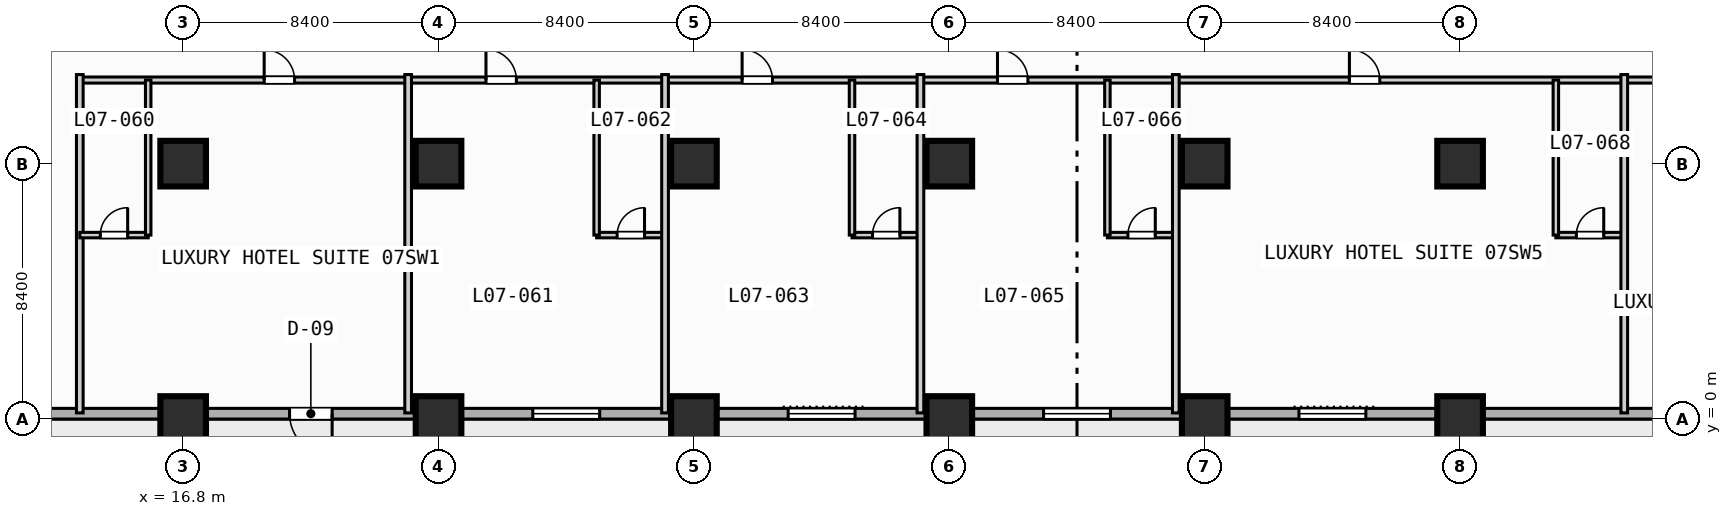
"""IFC4 building model, lengths in metres.
Left out: names, types, materials, properties, quantities, classifications, styles, units other than length and angle.
Written with IfcOpenShell. Run it as: python <this file> out.ifc"""

import sys

from ifc_helpers import new_model, si_unit, direction, frame, frame_2d, origin, origin_2d, place, context, subcontext, project, spatial, rectangle, extrude, element, fill, save


model = new_model("IFC4")
c1 = context("Model", 3, precision=1e-05, world=origin(), true_north=direction((0.0, 1.0)))
c2 = subcontext(c1, "Body", "Model", "MODEL_VIEW")
j1 = project(units=[si_unit("LENGTHUNIT", "METRE"), si_unit("PLANEANGLEUNIT", "RADIAN")], contexts=[c1])
p1 = place(None, origin())
s1 = spatial("IfcSite", under=j1, at=p1, CompositionType="ELEMENT")
p2 = place(p1, origin())
s2 = spatial("IfcBuilding", under=s1, at=p2, CompositionType="ELEMENT")
p3 = place(p2, frame((0.0, 0.0, 35.8)))
s3 = spatial("IfcBuildingStorey", under=s2, at=p3, CompositionType="ELEMENT", Elevation=35.8)
for number, where, z_axis, x_axis in (
    (1, (16.8, 0.0, 0.0), (0.0, 0.0, 1.0), (1.0, 0.0, 0.0)),
    (2, (16.8, 8.4, 0.0), (0.0, 0.0, 1.0), (1.0, 0.0, 0.0)),
    (3, (25.2, 0.0, 0.0), (0.0, 0.0, 1.0), (1.0, 0.0, 0.0)),
    (4, (25.2, 8.4, 0.0), (0.0, 0.0, 1.0), (1.0, 0.0, 0.0)),
    (5, (33.6, 0.0, 0.0), (0.0, 0.0, 1.0), (1.0, 0.0, 0.0)),
    (6, (33.6, 8.4, 0.0), (0.0, 0.0, 1.0), (1.0, 0.0, 0.0)),
    (7, (42.0, 0.0, 0.0), (0.0, 0.0, 1.0), (1.0, 0.0, 0.0)),
    (8, (42.0, 8.4, 0.0), (0.0, 0.0, 1.0), (1.0, 0.0, 0.0)),
    (9, (50.4, 0.0, 0.0), (0.0, 0.0, 1.0), (1.0, 0.0, 0.0)),
    (10, (50.4, 8.4, 0.0), (0.0, 0.0, 1.0), (1.0, 0.0, 0.0)),
    (11, (58.8, 0.0, 0.0), (0.0, 0.0, 1.0), (1.0, 0.0, 0.0)),
    (12, (58.8, 8.4, 0.0), (0.0, 0.0, 1.0), (1.0, 0.0, 0.0)),
):
    element("IfcColumn", number, at=place(p3, frame(where, z_axis=z_axis, x_axis=x_axis)), inside=s3, PredefinedType="COLUMN", context=c2, shape_type="SweptSolid", body=[
        extrude(rectangle(XDim=1.5, YDim=1.5, at=origin_2d()), origin(), (0.0, 0.0, 1.0), 3.8),
    ])
p4 = place(p3, frame((89.225, 0.175, 0.0), z_axis=(0.0, 0.0, 1.0), x_axis=(-1.0, 0.0, 0.0)))
e13 = element("IfcWall", 13, at=p4, inside=s3, PredefinedType="STANDARD", context=c2, shape_type="SweptSolid", body=[
    extrude(rectangle(XDim=86.05, YDim=0.35, at=frame_2d((43.025, 0.0))), origin(), (0.0, 0.0, 1.0), 3.55),
])
p5 = place(p4, frame((67.525, 0.0, 0.0)))
e14 = element("IfcOpeningElement", 14, at=p5, cuts=e13, PredefinedType="OPENING", context=c2, shape_type="SweptSolid", body=[
    extrude(rectangle(XDim=1.4, YDim=2.2, at=frame_2d((0.7, 1.1))), frame((0.0, 0.185, 0.0), z_axis=(0.0, -1.0, 0.0), x_axis=(1.0, 0.0, 0.0)), (0.0, 0.0, 1.0), 0.37),
])
p6 = place(p4, frame((58.725, 0.0, 0.85)))
e15 = element("IfcOpeningElement", 15, at=p6, cuts=e13, PredefinedType="OPENING", context=c2, shape_type="SweptSolid", body=[
    extrude(rectangle(XDim=2.2, YDim=1.8, at=frame_2d((1.1, 0.9))), frame((0.0, 0.185, 0.0), z_axis=(0.0, -1.0, 0.0), x_axis=(1.0, 0.0, 0.0)), (0.0, 0.0, 1.0), 0.37),
])
p7 = place(p4, frame((50.325, 0.0, 0.85)))
e16 = element("IfcOpeningElement", 16, at=p7, cuts=e13, PredefinedType="OPENING", context=c2, shape_type="SweptSolid", body=[
    extrude(rectangle(XDim=2.2, YDim=1.8, at=frame_2d((1.1, 0.9))), frame((0.0, 0.185, 0.0), z_axis=(0.0, -1.0, 0.0), x_axis=(1.0, 0.0, 0.0)), (0.0, 0.0, 1.0), 0.37),
])
p8 = place(p4, frame((41.925, 0.0, 0.85)))
e17 = element("IfcOpeningElement", 17, at=p8, cuts=e13, PredefinedType="OPENING", context=c2, shape_type="SweptSolid", body=[
    extrude(rectangle(XDim=2.2, YDim=1.8, at=frame_2d((1.1, 0.9))), frame((0.0, 0.185, 0.0), z_axis=(0.0, -1.0, 0.0), x_axis=(1.0, 0.0, 0.0)), (0.0, 0.0, 1.0), 0.37),
])
p9 = place(p4, frame((33.525, 0.0, 0.85)))
e18 = element("IfcOpeningElement", 18, at=p9, cuts=e13, PredefinedType="OPENING", context=c2, shape_type="SweptSolid", body=[
    extrude(rectangle(XDim=2.2, YDim=1.8, at=frame_2d((1.1, 0.9))), frame((0.0, 0.185, 0.0), z_axis=(0.0, -1.0, 0.0), x_axis=(1.0, 0.0, 0.0)), (0.0, 0.0, 1.0), 0.37),
])
p10 = place(p4, frame((16.725, 0.0, 0.85)))
e19 = element("IfcOpeningElement", 19, at=p10, cuts=e13, PredefinedType="OPENING", context=c2, shape_type="SweptSolid", body=[
    extrude(rectangle(XDim=2.2, YDim=1.8, at=frame_2d((1.1, 0.9))), frame((0.0, 0.185, 0.0), z_axis=(0.0, -1.0, 0.0), x_axis=(1.0, 0.0, 0.0)), (0.0, 0.0, 1.0), 0.37),
])
p11 = place(p4, frame((8.325, 0.0, 0.85)))
e20 = element("IfcOpeningElement", 20, at=p11, cuts=e13, PredefinedType="OPENING", context=c2, shape_type="SweptSolid", body=[
    extrude(rectangle(XDim=2.2, YDim=1.8, at=frame_2d((1.1, 0.9))), frame((0.0, 0.185, 0.0), z_axis=(0.0, -1.0, 0.0), x_axis=(1.0, 0.0, 0.0)), (0.0, 0.0, 1.0), 0.37),
])
p12 = place(p4, frame((2.4, 0.0, 0.85)))
e21 = element("IfcOpeningElement", 21, at=p12, cuts=e13, PredefinedType="OPENING", context=c2, shape_type="SweptSolid", body=[
    extrude(rectangle(XDim=1.8, YDim=1.8, at=frame_2d((0.9, 0.9))), frame((0.0, 0.185, 0.0), z_axis=(0.0, -1.0, 0.0), x_axis=(1.0, 0.0, 0.0)), (0.0, 0.0, 1.0), 0.37),
])
p13 = place(p3, frame((13.4, 11.15, 0.0), z_axis=(0.0, 0.0, 1.0), x_axis=(1.0, 0.0, 0.0)))
e22 = element("IfcWall", 22, at=p13, inside=s3, PredefinedType="PARTITIONING", context=c2, shape_type="SweptSolid", body=[
    extrude(rectangle(XDim=75.4, YDim=0.2, at=frame_2d((37.7, 0.0))), origin(), (0.0, 0.0, 1.0), 3.55),
])
p14 = place(p13, frame((6.065, 0.0, 0.0)))
e23 = element("IfcOpeningElement", 23, at=p14, cuts=e22, PredefinedType="OPENING", context=c2, shape_type="SweptSolid", body=[
    extrude(rectangle(XDim=1.0, YDim=2.15, at=frame_2d((0.5, 1.075))), frame((0.0, 0.11, 0.0), z_axis=(0.0, -1.0, 0.0), x_axis=(1.0, 0.0, 0.0)), (0.0, 0.0, 1.0), 0.22),
])
p15 = place(p13, frame((13.36, 0.0, 0.0)))
e24 = element("IfcOpeningElement", 24, at=p15, cuts=e22, PredefinedType="OPENING", context=c2, shape_type="SweptSolid", body=[
    extrude(rectangle(XDim=1.0, YDim=2.15, at=frame_2d((0.5, 1.075))), frame((0.0, 0.11, 0.0), z_axis=(0.0, -1.0, 0.0), x_axis=(1.0, 0.0, 0.0)), (0.0, 0.0, 1.0), 0.22),
])
p16 = place(p13, frame((21.785, 0.0, 0.0)))
e25 = element("IfcOpeningElement", 25, at=p16, cuts=e22, PredefinedType="OPENING", context=c2, shape_type="SweptSolid", body=[
    extrude(rectangle(XDim=1.0, YDim=2.15, at=frame_2d((0.5, 1.075))), frame((0.0, 0.11, 0.0), z_axis=(0.0, -1.0, 0.0), x_axis=(1.0, 0.0, 0.0)), (0.0, 0.0, 1.0), 0.22),
])
p17 = place(p13, frame((30.185, 0.0, 0.0)))
e26 = element("IfcOpeningElement", 26, at=p17, cuts=e22, PredefinedType="OPENING", context=c2, shape_type="SweptSolid", body=[
    extrude(rectangle(XDim=1.0, YDim=2.15, at=frame_2d((0.5, 1.075))), frame((0.0, 0.11, 0.0), z_axis=(0.0, -1.0, 0.0), x_axis=(1.0, 0.0, 0.0)), (0.0, 0.0, 1.0), 0.22),
])
p18 = place(p13, frame((41.76, 0.0, 0.0)))
e27 = element("IfcOpeningElement", 27, at=p18, cuts=e22, PredefinedType="OPENING", context=c2, shape_type="SweptSolid", body=[
    extrude(rectangle(XDim=1.0, YDim=2.15, at=frame_2d((0.5, 1.075))), frame((0.0, 0.11, 0.0), z_axis=(0.0, -1.0, 0.0), x_axis=(1.0, 0.0, 0.0)), (0.0, 0.0, 1.0), 0.22),
])
p19 = place(p13, frame((54.36, 0.0, 0.0)))
e28 = element("IfcOpeningElement", 28, at=p19, cuts=e22, PredefinedType="OPENING", context=c2, shape_type="SweptSolid", body=[
    extrude(rectangle(XDim=1.0, YDim=2.15, at=frame_2d((0.5, 1.075))), frame((0.0, 0.11, 0.0), z_axis=(0.0, -1.0, 0.0), x_axis=(1.0, 0.0, 0.0)), (0.0, 0.0, 1.0), 0.22),
])
p20 = place(p13, frame((63.785, 0.0, 0.0)))
e29 = element("IfcOpeningElement", 29, at=p20, cuts=e22, PredefinedType="OPENING", context=c2, shape_type="SweptSolid", body=[
    extrude(rectangle(XDim=1.0, YDim=2.15, at=frame_2d((0.5, 1.075))), frame((0.0, 0.11, 0.0), z_axis=(0.0, -1.0, 0.0), x_axis=(1.0, 0.0, 0.0)), (0.0, 0.0, 1.0), 0.22),
])
p21 = place(p13, frame((70.86, 0.0, 0.0)))
e30 = element("IfcOpeningElement", 30, at=p21, cuts=e22, PredefinedType="OPENING", context=c2, shape_type="SweptSolid", body=[
    extrude(rectangle(XDim=1.0, YDim=2.15, at=frame_2d((0.5, 1.075))), frame((0.0, 0.11, 0.0), z_axis=(0.0, -1.0, 0.0), x_axis=(1.0, 0.0, 0.0)), (0.0, 0.0, 1.0), 0.22),
])
p22 = place(p3, frame((13.4, 0.2, 0.0), z_axis=(0.0, 0.0, 1.0), x_axis=(0.0, 1.0, 0.0)))
e31 = element("IfcWall", 31, at=p22, inside=s3, PredefinedType="PARTITIONING", context=c2, shape_type="SweptSolid", body=[
    extrude(rectangle(XDim=11.13, YDim=0.22, at=frame_2d((5.565, 0.0))), origin(), (0.0, 0.0, 1.0), 3.55),
])
p23 = place(p3, frame((13.4, 6.05, 0.0), z_axis=(0.0, 0.0, 1.0), x_axis=(1.0, 0.0, 0.0)))
e32 = element("IfcWall", 32, at=p23, inside=s3, PredefinedType="PLUMBINGWALL", context=c2, shape_type="SweptSolid", body=[
    extrude(rectangle(XDim=2.25, YDim=0.18, at=frame_2d((1.125, 0.0))), origin(), (0.0, 0.0, 1.0), 3.55),
])
p24 = place(p23, frame((0.675, 0.0, 0.0)))
e33 = element("IfcOpeningElement", 33, at=p24, cuts=e32, PredefinedType="OPENING", context=c2, shape_type="SweptSolid", body=[
    extrude(rectangle(XDim=0.9, YDim=2.1, at=frame_2d((0.45, 1.05))), frame((0.0, 0.1, 0.0), z_axis=(0.0, -1.0, 0.0), x_axis=(1.0, 0.0, 0.0)), (0.0, 0.0, 1.0), 0.2),
])
p25 = place(p3, frame((15.65, 6.05, 0.0), z_axis=(0.0, 0.0, 1.0), x_axis=(0.0, 1.0, 0.0)))
e34 = element("IfcWall", 34, at=p25, inside=s3, PredefinedType="PLUMBINGWALL", context=c2, shape_type="SweptSolid", body=[
    extrude(rectangle(XDim=5.1, YDim=0.18, at=frame_2d((2.55, 0.0))), origin(), (0.0, 0.0, 1.0), 3.55),
])
p26 = place(p3, frame((24.2, 0.2, 0.0), z_axis=(0.0, 0.0, 1.0), x_axis=(0.0, 1.0, 0.0)))
e35 = element("IfcWall", 35, at=p26, inside=s3, PredefinedType="PARTITIONING", context=c2, shape_type="SweptSolid", body=[
    extrude(rectangle(XDim=11.13, YDim=0.22, at=frame_2d((5.565, 0.0))), origin(), (0.0, 0.0, 1.0), 3.55),
])
p27 = place(p3, frame((30.4, 6.05, 0.0), z_axis=(0.0, 0.0, 1.0), x_axis=(1.0, 0.0, 0.0)))
e36 = element("IfcWall", 36, at=p27, inside=s3, PredefinedType="PLUMBINGWALL", context=c2, shape_type="SweptSolid", body=[
    extrude(rectangle(XDim=2.25, YDim=0.18, at=frame_2d((1.125, 0.0))), origin(), (0.0, 0.0, 1.0), 3.55),
])
p28 = place(p27, frame((0.675, 0.0, 0.0)))
e37 = element("IfcOpeningElement", 37, at=p28, cuts=e36, PredefinedType="OPENING", context=c2, shape_type="SweptSolid", body=[
    extrude(rectangle(XDim=0.9, YDim=2.1, at=frame_2d((0.45, 1.05))), frame((0.0, 0.1, 0.0), z_axis=(0.0, -1.0, 0.0), x_axis=(1.0, 0.0, 0.0)), (0.0, 0.0, 1.0), 0.2),
])
p29 = place(p3, frame((30.4, 6.05, 0.0), z_axis=(0.0, 0.0, 1.0), x_axis=(0.0, 1.0, 0.0)))
e38 = element("IfcWall", 38, at=p29, inside=s3, PredefinedType="PLUMBINGWALL", context=c2, shape_type="SweptSolid", body=[
    extrude(rectangle(XDim=5.1, YDim=0.18, at=frame_2d((2.55, 0.0))), origin(), (0.0, 0.0, 1.0), 3.55),
])
p30 = place(p3, frame((32.65, 0.2, 0.0), z_axis=(0.0, 0.0, 1.0), x_axis=(0.0, 1.0, 0.0)))
e39 = element("IfcWall", 39, at=p30, inside=s3, PredefinedType="PARTITIONING", context=c2, shape_type="SweptSolid", body=[
    extrude(rectangle(XDim=11.13, YDim=0.22, at=frame_2d((5.565, 0.0))), origin(), (0.0, 0.0, 1.0), 3.55),
])
p31 = place(p3, frame((38.8, 6.05, 0.0), z_axis=(0.0, 0.0, 1.0), x_axis=(1.0, 0.0, 0.0)))
e40 = element("IfcWall", 40, at=p31, inside=s3, PredefinedType="PLUMBINGWALL", context=c2, shape_type="SweptSolid", body=[
    extrude(rectangle(XDim=2.25, YDim=0.18, at=frame_2d((1.125, 0.0))), origin(), (0.0, 0.0, 1.0), 3.55),
])
p32 = place(p31, frame((0.675, 0.0, 0.0)))
e41 = element("IfcOpeningElement", 41, at=p32, cuts=e40, PredefinedType="OPENING", context=c2, shape_type="SweptSolid", body=[
    extrude(rectangle(XDim=0.9, YDim=2.1, at=frame_2d((0.45, 1.05))), frame((0.0, 0.1, 0.0), z_axis=(0.0, -1.0, 0.0), x_axis=(1.0, 0.0, 0.0)), (0.0, 0.0, 1.0), 0.2),
])
p33 = place(p3, frame((38.8, 6.05, 0.0), z_axis=(0.0, 0.0, 1.0), x_axis=(0.0, 1.0, 0.0)))
e42 = element("IfcWall", 42, at=p33, inside=s3, PredefinedType="PLUMBINGWALL", context=c2, shape_type="SweptSolid", body=[
    extrude(rectangle(XDim=5.1, YDim=0.18, at=frame_2d((2.55, 0.0))), origin(), (0.0, 0.0, 1.0), 3.55),
])
p34 = place(p3, frame((41.05, 0.2, 0.0), z_axis=(0.0, 0.0, 1.0), x_axis=(0.0, 1.0, 0.0)))
e43 = element("IfcWall", 43, at=p34, inside=s3, PredefinedType="PARTITIONING", context=c2, shape_type="SweptSolid", body=[
    extrude(rectangle(XDim=11.13, YDim=0.22, at=frame_2d((5.565, 0.0))), origin(), (0.0, 0.0, 1.0), 3.55),
])
p35 = place(p3, frame((47.2, 6.05, 0.0), z_axis=(0.0, 0.0, 1.0), x_axis=(1.0, 0.0, 0.0)))
e44 = element("IfcWall", 44, at=p35, inside=s3, PredefinedType="PLUMBINGWALL", context=c2, shape_type="SweptSolid", body=[
    extrude(rectangle(XDim=2.25, YDim=0.18, at=frame_2d((1.125, 0.0))), origin(), (0.0, 0.0, 1.0), 3.55),
])
p36 = place(p35, frame((0.675, 0.0, 0.0)))
e45 = element("IfcOpeningElement", 45, at=p36, cuts=e44, PredefinedType="OPENING", context=c2, shape_type="SweptSolid", body=[
    extrude(rectangle(XDim=0.9, YDim=2.1, at=frame_2d((0.45, 1.05))), frame((0.0, 0.1, 0.0), z_axis=(0.0, -1.0, 0.0), x_axis=(1.0, 0.0, 0.0)), (0.0, 0.0, 1.0), 0.2),
])
p37 = place(p3, frame((47.2, 6.05, 0.0), z_axis=(0.0, 0.0, 1.0), x_axis=(0.0, 1.0, 0.0)))
e46 = element("IfcWall", 46, at=p37, inside=s3, PredefinedType="PLUMBINGWALL", context=c2, shape_type="SweptSolid", body=[
    extrude(rectangle(XDim=5.1, YDim=0.18, at=frame_2d((2.55, 0.0))), origin(), (0.0, 0.0, 1.0), 3.55),
])
p38 = place(p3, frame((49.45, 0.2, 0.0), z_axis=(0.0, 0.0, 1.0), x_axis=(0.0, 1.0, 0.0)))
e47 = element("IfcWall", 47, at=p38, inside=s3, PredefinedType="PARTITIONING", context=c2, shape_type="SweptSolid", body=[
    extrude(rectangle(XDim=11.13, YDim=0.22, at=frame_2d((5.565, 0.0))), origin(), (0.0, 0.0, 1.0), 3.55),
])
p39 = place(p3, frame((61.95, 6.05, 0.0), z_axis=(0.0, 0.0, 1.0), x_axis=(1.0, 0.0, 0.0)))
e48 = element("IfcWall", 48, at=p39, inside=s3, PredefinedType="PLUMBINGWALL", context=c2, shape_type="SweptSolid", body=[
    extrude(rectangle(XDim=2.25, YDim=0.18, at=frame_2d((1.125, 0.0))), origin(), (0.0, 0.0, 1.0), 3.55),
])
p40 = place(p39, frame((0.675, 0.0, 0.0)))
e49 = element("IfcOpeningElement", 49, at=p40, cuts=e48, PredefinedType="OPENING", context=c2, shape_type="SweptSolid", body=[
    extrude(rectangle(XDim=0.9, YDim=2.1, at=frame_2d((0.45, 1.05))), frame((0.0, 0.1, 0.0), z_axis=(0.0, -1.0, 0.0), x_axis=(1.0, 0.0, 0.0)), (0.0, 0.0, 1.0), 0.2),
])
p41 = place(p3, frame((61.95, 6.05, 0.0), z_axis=(0.0, 0.0, 1.0), x_axis=(0.0, 1.0, 0.0)))
e50 = element("IfcWall", 50, at=p41, inside=s3, PredefinedType="PLUMBINGWALL", context=c2, shape_type="SweptSolid", body=[
    extrude(rectangle(XDim=5.1, YDim=0.18, at=frame_2d((2.55, 0.0))), origin(), (0.0, 0.0, 1.0), 3.55),
])
p42 = place(p3, frame((64.2, 0.2, 0.0), z_axis=(0.0, 0.0, 1.0), x_axis=(0.0, 1.0, 0.0)))
e51 = element("IfcWall", 51, at=p42, inside=s3, PredefinedType="PARTITIONING", context=c2, shape_type="SweptSolid", body=[
    extrude(rectangle(XDim=11.13, YDim=0.22, at=frame_2d((5.565, 0.0))), origin(), (0.0, 0.0, 1.0), 3.55),
])
p43 = place(p5, origin())
e52 = element("IfcDoor", 52, at=p43, inside=s3, OperationType="SINGLE_SWING_LEFT", PredefinedType="DOOR", context=c2, shape_type="SweptSolid", body=[
    extrude(rectangle(XDim=1.4, YDim=2.2, at=frame_2d((0.7, 1.1))), frame((0.0, 0.025, 0.0), z_axis=(0.0, -1.0, 0.0), x_axis=(1.0, 0.0, 0.0)), (0.0, 0.0, 1.0), 0.05),
])
fill(e14, e52)
p44 = place(p6, origin())
e53 = element("IfcWindow", 53, at=p44, inside=s3, PartitioningType="SINGLE_PANEL", PredefinedType="WINDOW", context=c2, shape_type="SweptSolid", body=[
    extrude(rectangle(XDim=2.2, YDim=1.8, at=frame_2d((1.1, 0.9))), frame((0.0, 0.03, 0.0), z_axis=(0.0, -1.0, 0.0), x_axis=(1.0, 0.0, 0.0)), (0.0, 0.0, 1.0), 0.06),
])
fill(e15, e53)
p45 = place(p7, origin())
e54 = element("IfcWindow", 54, at=p45, inside=s3, PartitioningType="SINGLE_PANEL", PredefinedType="WINDOW", context=c2, shape_type="SweptSolid", body=[
    extrude(rectangle(XDim=2.2, YDim=1.8, at=frame_2d((1.1, 0.9))), frame((0.0, 0.03, 0.0), z_axis=(0.0, -1.0, 0.0), x_axis=(1.0, 0.0, 0.0)), (0.0, 0.0, 1.0), 0.06),
])
fill(e16, e54)
p46 = place(p8, origin())
e55 = element("IfcWindow", 55, at=p46, inside=s3, PartitioningType="SINGLE_PANEL", PredefinedType="WINDOW", context=c2, shape_type="SweptSolid", body=[
    extrude(rectangle(XDim=2.2, YDim=1.8, at=frame_2d((1.1, 0.9))), frame((0.0, 0.03, 0.0), z_axis=(0.0, -1.0, 0.0), x_axis=(1.0, 0.0, 0.0)), (0.0, 0.0, 1.0), 0.06),
])
fill(e17, e55)
p47 = place(p9, origin())
e56 = element("IfcWindow", 56, at=p47, inside=s3, PartitioningType="SINGLE_PANEL", PredefinedType="WINDOW", context=c2, shape_type="SweptSolid", body=[
    extrude(rectangle(XDim=2.2, YDim=1.8, at=frame_2d((1.1, 0.9))), frame((0.0, 0.03, 0.0), z_axis=(0.0, -1.0, 0.0), x_axis=(1.0, 0.0, 0.0)), (0.0, 0.0, 1.0), 0.06),
])
fill(e18, e56)
p48 = place(p14, origin())
e57 = element("IfcDoor", 57, at=p48, inside=s3, OperationType="SINGLE_SWING_LEFT", PredefinedType="DOOR", context=c2, shape_type="SweptSolid", body=[
    extrude(rectangle(XDim=1.0, YDim=2.15, at=frame_2d((0.5, 1.075))), frame((0.0, 0.025, 0.0), z_axis=(0.0, -1.0, 0.0), x_axis=(1.0, 0.0, 0.0)), (0.0, 0.0, 1.0), 0.05),
])
fill(e23, e57)
p49 = place(p15, origin())
e58 = element("IfcDoor", 58, at=p49, inside=s3, OperationType="SINGLE_SWING_LEFT", PredefinedType="DOOR", context=c2, shape_type="SweptSolid", body=[
    extrude(rectangle(XDim=1.0, YDim=2.15, at=frame_2d((0.5, 1.075))), frame((0.0, 0.025, 0.0), z_axis=(0.0, -1.0, 0.0), x_axis=(1.0, 0.0, 0.0)), (0.0, 0.0, 1.0), 0.05),
])
fill(e24, e58)
p50 = place(p16, origin())
e59 = element("IfcDoor", 59, at=p50, inside=s3, OperationType="SINGLE_SWING_LEFT", PredefinedType="DOOR", context=c2, shape_type="SweptSolid", body=[
    extrude(rectangle(XDim=1.0, YDim=2.15, at=frame_2d((0.5, 1.075))), frame((0.0, 0.025, 0.0), z_axis=(0.0, -1.0, 0.0), x_axis=(1.0, 0.0, 0.0)), (0.0, 0.0, 1.0), 0.05),
])
fill(e25, e59)
p51 = place(p17, origin())
e60 = element("IfcDoor", 60, at=p51, inside=s3, OperationType="SINGLE_SWING_LEFT", PredefinedType="DOOR", context=c2, shape_type="SweptSolid", body=[
    extrude(rectangle(XDim=1.0, YDim=2.15, at=frame_2d((0.5, 1.075))), frame((0.0, 0.025, 0.0), z_axis=(0.0, -1.0, 0.0), x_axis=(1.0, 0.0, 0.0)), (0.0, 0.0, 1.0), 0.05),
])
fill(e26, e60)
p52 = place(p18, origin())
e61 = element("IfcDoor", 61, at=p52, inside=s3, OperationType="SINGLE_SWING_LEFT", PredefinedType="DOOR", context=c2, shape_type="SweptSolid", body=[
    extrude(rectangle(XDim=1.0, YDim=2.15, at=frame_2d((0.5, 1.075))), frame((0.0, 0.025, 0.0), z_axis=(0.0, -1.0, 0.0), x_axis=(1.0, 0.0, 0.0)), (0.0, 0.0, 1.0), 0.05),
])
fill(e27, e61)
p53 = place(p24, origin())
e62 = element("IfcDoor", 62, at=p53, inside=s3, OperationType="SINGLE_SWING_RIGHT", PredefinedType="DOOR", context=c2, shape_type="SweptSolid", body=[
    extrude(rectangle(XDim=0.9, YDim=2.1, at=frame_2d((0.45, 1.05))), frame((0.0, 0.025, 0.0), z_axis=(0.0, -1.0, 0.0), x_axis=(1.0, 0.0, 0.0)), (0.0, 0.0, 1.0), 0.05),
])
fill(e33, e62)
p54 = place(p28, origin())
e63 = element("IfcDoor", 63, at=p54, inside=s3, OperationType="SINGLE_SWING_RIGHT", PredefinedType="DOOR", context=c2, shape_type="SweptSolid", body=[
    extrude(rectangle(XDim=0.9, YDim=2.1, at=frame_2d((0.45, 1.05))), frame((0.0, 0.025, 0.0), z_axis=(0.0, -1.0, 0.0), x_axis=(1.0, 0.0, 0.0)), (0.0, 0.0, 1.0), 0.05),
])
fill(e37, e63)
p55 = place(p32, origin())
e64 = element("IfcDoor", 64, at=p55, inside=s3, OperationType="SINGLE_SWING_RIGHT", PredefinedType="DOOR", context=c2, shape_type="SweptSolid", body=[
    extrude(rectangle(XDim=0.9, YDim=2.1, at=frame_2d((0.45, 1.05))), frame((0.0, 0.025, 0.0), z_axis=(0.0, -1.0, 0.0), x_axis=(1.0, 0.0, 0.0)), (0.0, 0.0, 1.0), 0.05),
])
fill(e41, e64)
p56 = place(p36, origin())
e65 = element("IfcDoor", 65, at=p56, inside=s3, OperationType="SINGLE_SWING_RIGHT", PredefinedType="DOOR", context=c2, shape_type="SweptSolid", body=[
    extrude(rectangle(XDim=0.9, YDim=2.1, at=frame_2d((0.45, 1.05))), frame((0.0, 0.025, 0.0), z_axis=(0.0, -1.0, 0.0), x_axis=(1.0, 0.0, 0.0)), (0.0, 0.0, 1.0), 0.05),
])
fill(e45, e65)
p57 = place(p40, origin())
e66 = element("IfcDoor", 66, at=p57, inside=s3, OperationType="SINGLE_SWING_RIGHT", PredefinedType="DOOR", context=c2, shape_type="SweptSolid", body=[
    extrude(rectangle(XDim=0.9, YDim=2.1, at=frame_2d((0.45, 1.05))), frame((0.0, 0.025, 0.0), z_axis=(0.0, -1.0, 0.0), x_axis=(1.0, 0.0, 0.0)), (0.0, 0.0, 1.0), 0.05),
])
fill(e49, e66)
save(model, sys.argv[1])
